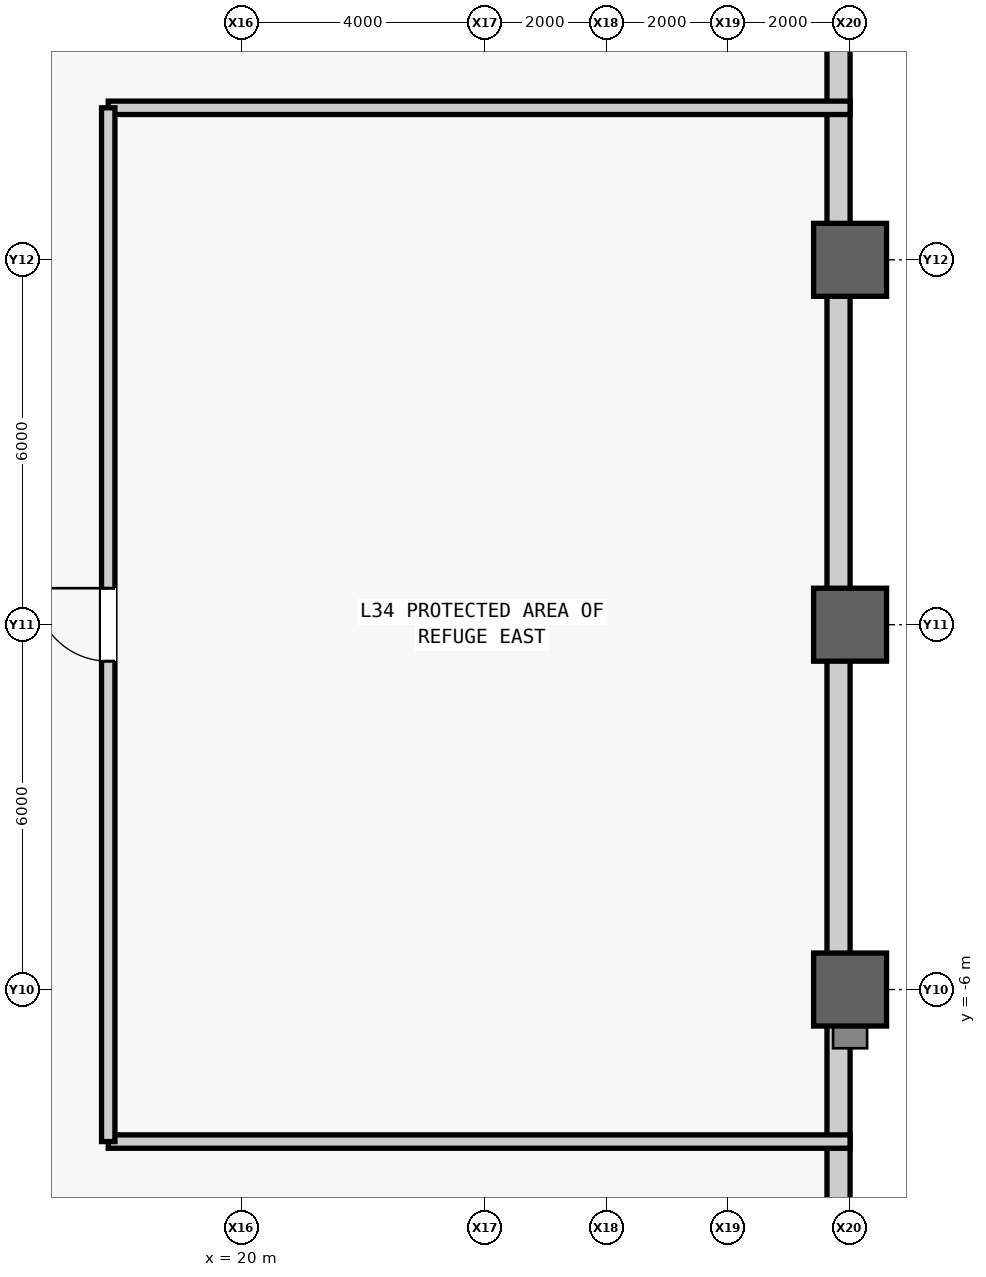
"""IFC4 building model, lengths in metres.
Left out: names, types, materials, properties, quantities, classifications, styles, units other than length and angle.
Written with IfcOpenShell. Run it as: python <this file> out.ifc"""

import sys

from ifc_helpers import new_model, si_unit, direction, frame, frame_2d, origin, origin_2d, place, context, subcontext, project, spatial, rectangle, hollow_rectangle, extrude, source, transform, mapped, element, fill, save


model = new_model("IFC4")
c1 = context("Model", 3, precision=1e-05, world=origin(), true_north=direction((0.0, 1.0)))
c2 = subcontext(c1, "Body", "Model", "MODEL_VIEW")
j1 = project(units=[si_unit("LENGTHUNIT", "METRE"), si_unit("PLANEANGLEUNIT", "RADIAN")], contexts=[c1])
p1 = place(None, origin())
s1 = spatial("IfcSite", under=j1, at=p1, CompositionType="ELEMENT")
p2 = place(p1, origin())
s2 = spatial("IfcBuilding", under=s1, at=p2, CompositionType="ELEMENT")
p3 = place(p2, frame((0.0, 0.0, 149.9)))
s3 = spatial("IfcBuildingStorey", under=s2, at=p3, CompositionType="ELEMENT", Elevation=149.9)
m1 = source(origin(), c2, "Body", "SweptSolid", [
    extrude(hollow_rectangle(XDim=1.2, YDim=1.2, WallThickness=0.07, at=origin_2d()), origin(), (0.0, 0.0, 1.0), 5.2),
])
for number, where, z_axis, x_axis in (
    (1, (30.0, -6.0, 0.0), (0.0, 0.0, 1.0), (1.0, 0.0, 0.0)),
    (2, (30.0, 0.0, 0.0), (0.0, 0.0, 1.0), (1.0, 0.0, 0.0)),
    (3, (30.0, 6.0, 0.0), (0.0, 0.0, 1.0), (1.0, 0.0, 0.0)),
):
    element("IfcColumn", number, at=place(p3, frame(where, z_axis=z_axis, x_axis=x_axis)), inside=s3, PredefinedType="COLUMN", context=c2, shape_type="MappedRepresentation", body=[
        mapped(m1, transform((0.0, 0.0, 0.0), scale=1.0)),
    ])
m2 = source(origin(), c2, "Body", "SweptSolid", [
    extrude(rectangle(XDim=51.0, YDim=0.38, at=frame_2d((25.5, 0.0))), origin(), (0.0, 0.0, 1.0), 4.285),
])
p4 = place(p3, frame((29.81, -25.5, 0.0), z_axis=(0.0, 0.0, 1.0), x_axis=(0.0, 1.0, 0.0)))
e4 = element("IfcWall", 4, at=p4, inside=s3, PredefinedType="STANDARD", context=c2, shape_type="MappedRepresentation", body=[
    mapped(m2, transform((0.0, 0.0, 0.0), scale=1.0)),
])
m3 = source(origin(), c2, "Body", "SweptSolid", [
    extrude(rectangle(XDim=0.9, YDim=2.4, at=frame_2d((0.45, 1.2))), frame((0.0, 0.2, 0.0), z_axis=(0.0, -1.0, 0.0), x_axis=(1.0, 0.0, 0.0)), (0.0, 0.0, 1.0), 0.4),
])
p5 = place(p4, frame((12.3, 0.0, 0.7)))
e5 = element("IfcOpeningElement", 5, at=p5, cuts=e4, PredefinedType="OPENING", context=c2, shape_type="MappedRepresentation", body=[
    mapped(m3, transform((0.0, 0.0, 0.0), scale=1.0)),
])
p6 = place(p4, frame((37.8, 0.0, 0.7)))
e6 = element("IfcOpeningElement", 6, at=p6, cuts=e4, PredefinedType="OPENING", context=c2, shape_type="MappedRepresentation", body=[
    mapped(m3, transform((0.0, 0.0, 0.0), scale=1.0)),
])
m4 = source(origin(), c2, "Body", "SweptSolid", [
    extrude(rectangle(XDim=12.2, YDim=0.22, at=frame_2d((6.1, 0.0))), origin(), (0.0, 0.0, 1.0), 4.98),
])
for number, where, z_axis, x_axis in (
    (7, (17.8, -8.5, 0.0), (0.0, 0.0, 1.0), (1.0, 0.0, 0.0)),
    (8, (17.8, 8.5, 0.0), (0.0, 0.0, 1.0), (1.0, 0.0, 0.0)),
):
    element("IfcWall", number, at=place(p3, frame(where, z_axis=z_axis, x_axis=x_axis)), inside=s3, PredefinedType="PARTITIONING", context=c2, shape_type="MappedRepresentation", body=[
        mapped(m4, transform((0.0, 0.0, 0.0), scale=1.0)),
    ])
m5 = source(origin(), c2, "Body", "SweptSolid", [
    extrude(rectangle(XDim=17.0, YDim=0.22, at=frame_2d((8.5, 0.0))), origin(), (0.0, 0.0, 1.0), 4.98),
])
p7 = place(p3, frame((17.8, -8.5, 0.0), z_axis=(0.0, 0.0, 1.0), x_axis=(0.0, 1.0, 0.0)))
e9 = element("IfcWall", 9, at=p7, inside=s3, PredefinedType="PARTITIONING", context=c2, shape_type="MappedRepresentation", body=[
    mapped(m5, transform((0.0, 0.0, 0.0), scale=1.0)),
])
m6 = source(origin(), c2, "Body", "SweptSolid", [
    extrude(rectangle(XDim=1.2, YDim=2.2, at=frame_2d((0.6, 1.1))), frame((0.0, 0.12, 0.0), z_axis=(0.0, -1.0, 0.0), x_axis=(1.0, 0.0, 0.0)), (0.0, 0.0, 1.0), 0.24),
])
p8 = place(p7, frame((7.9, 0.0, 0.0)))
e10 = element("IfcOpeningElement", 10, at=p8, cuts=e9, PredefinedType="OPENING", context=c2, shape_type="MappedRepresentation", body=[
    mapped(m6, transform((0.0, 0.0, 0.0), scale=1.0)),
])
m7 = source(origin(), c2, "Body", "SweptSolid", [
    extrude(rectangle(XDim=1.2, YDim=2.2, at=frame_2d((0.6, 1.1))), frame((0.0, 0.025, 0.0), z_axis=(0.0, -1.0, 0.0), x_axis=(1.0, 0.0, 0.0)), (0.0, 0.0, 1.0), 0.05),
])
p9 = place(p8, origin())
e11 = element("IfcDoor", 11, at=p9, inside=s3, OperationType="SINGLE_SWING_RIGHT", PredefinedType="DOOR", context=c2, shape_type="MappedRepresentation", body=[
    mapped(m7, transform((0.0, 0.0, 0.0), scale=1.0)),
])
fill(e10, e11)
save(model, sys.argv[1])
